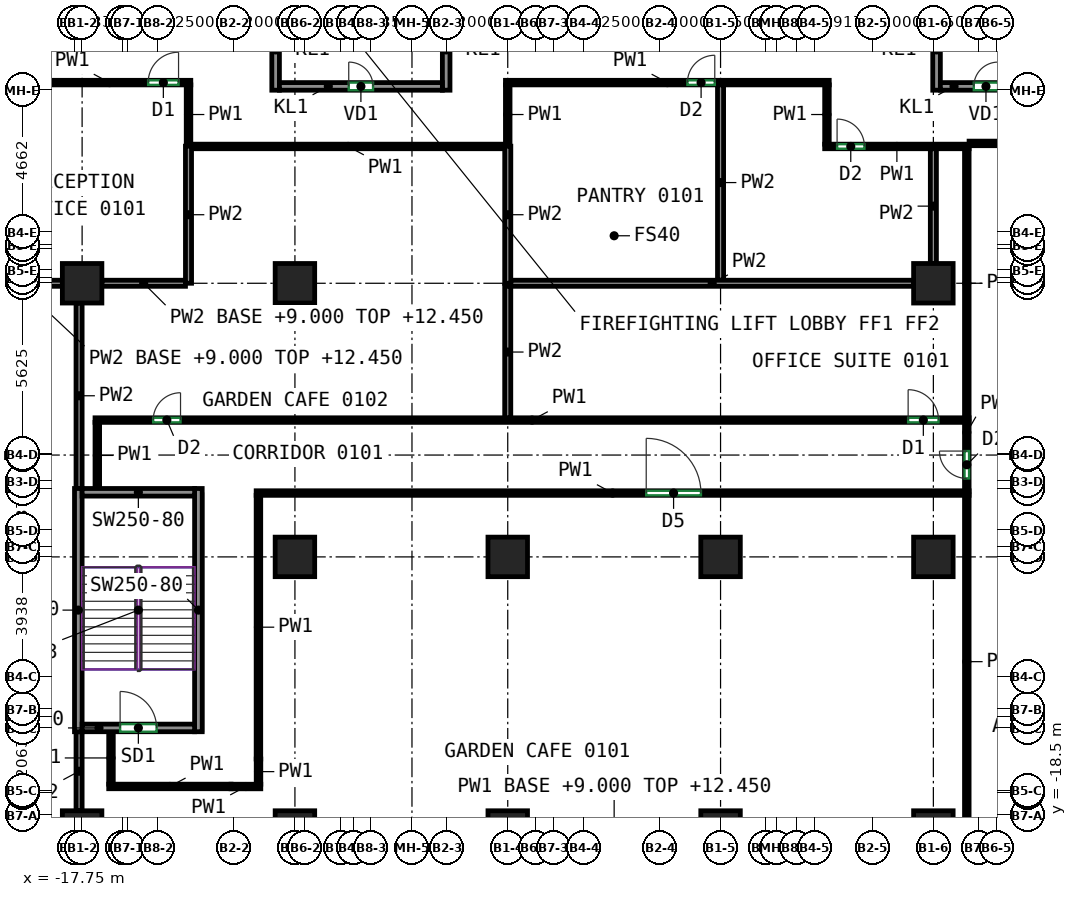
"""IFC4 building model, lengths in metres.
Left out: names, types, materials, properties, quantities, classifications, styles, units other than length and angle.
Written with IfcOpenShell. Run it as: python <this file> out.ifc"""

import sys

from ifc_helpers import new_model, si_unit, direction, frame, frame_2d, origin, origin_2d, place, context, subcontext, project, spatial, rectangle, extrude, source, transform, mapped, element, fill, save


model = new_model("IFC4")
c1 = context("Model", 3, precision=1e-05, world=origin(), true_north=direction((0.0, 1.0)))
c2 = subcontext(c1, "Body", "Model", "MODEL_VIEW")
j1 = project(units=[si_unit("LENGTHUNIT", "METRE"), si_unit("PLANEANGLEUNIT", "RADIAN")], contexts=[c1])
p1 = place(None, origin())
s1 = spatial("IfcSite", under=j1, at=p1, CompositionType="ELEMENT")
p2 = place(p1, origin())
s2 = spatial("IfcBuilding", under=s1, at=p2, CompositionType="ELEMENT")
p3 = place(p2, frame((0.0, 0.0, 9.0)))
s3 = spatial("IfcBuildingStorey", under=s2, at=p3, CompositionType="ELEMENT", Elevation=9.0)
m1 = source(origin(), c2, "Body", "SweptSolid", [
    extrude(rectangle(XDim=1.3, YDim=1.3, at=origin_2d()), origin(), (0.0, 0.0, 1.0), 4.1),
])
for number, where, z_axis, x_axis in (
    (1, (-17.5, -19.0, 0.0), (0.0, 0.0, 1.0), (1.0, 0.0, 0.0)),
    (2, (-17.5, -1.0, 0.0), (0.0, 0.0, 1.0), (1.0, 0.0, 0.0)),
    (3, (-10.5, -19.0, 0.0), (0.0, 0.0, 1.0), (1.0, 0.0, 0.0)),
    (4, (-10.5, -10.0, 0.0), (0.0, 0.0, 1.0), (1.0, 0.0, 0.0)),
    (5, (-10.5, -1.0, 0.0), (0.0, 0.0, 1.0), (1.0, 0.0, 0.0)),
    (6, (-3.5, -19.0, 0.0), (0.0, 0.0, 1.0), (1.0, 0.0, 0.0)),
    (7, (-3.5, -10.0, 0.0), (0.0, 0.0, 1.0), (1.0, 0.0, 0.0)),
    (8, (3.5, -19.0, 0.0), (0.0, 0.0, 1.0), (1.0, 0.0, 0.0)),
    (9, (3.5, -10.0, 0.0), (0.0, 0.0, 1.0), (1.0, 0.0, 0.0)),
    (10, (10.5, -19.0, 0.0), (0.0, 0.0, 1.0), (1.0, 0.0, 0.0)),
    (11, (10.5, -10.0, 0.0), (0.0, 0.0, 1.0), (1.0, 0.0, 0.0)),
    (12, (10.5, -1.0, 0.0), (0.0, 0.0, 1.0), (1.0, 0.0, 0.0)),
):
    element("IfcColumn", number, at=place(p3, frame(where, z_axis=z_axis, x_axis=x_axis)), inside=s3, PredefinedType="COLUMN", context=c2, shape_type="MappedRepresentation", body=[
        mapped(m1, transform((0.0, 0.0, 0.0))),
    ])
m2 = source(origin(), c2, "Body", "SweptSolid", [
    extrude(rectangle(XDim=8.0, YDim=0.25, at=frame_2d((4.0, 0.0))), origin(), (0.0, 0.0, 1.0), 4.1),
])
for number, where, z_axis, x_axis in (
    (13, (-17.625, -15.75, 0.0), (0.0, 0.0, 1.0), (0.0, 1.0, 0.0)),
    (14, (-13.675, -15.75, 0.0), (0.0, 0.0, 1.0), (0.0, 1.0, 0.0)),
):
    element("IfcWall", number, at=place(p3, frame(where, z_axis=z_axis, x_axis=x_axis)), inside=s3, PredefinedType="SHEAR", context=c2, shape_type="MappedRepresentation", body=[
        mapped(m2, transform((0.0, 0.0, 0.0))),
    ])
m3 = source(origin(), c2, "Body", "SweptSolid", [
    extrude(rectangle(XDim=3.7, YDim=0.25, at=frame_2d((1.85, 0.0))), origin(), (0.0, 0.0, 1.0), 4.1),
])
p4 = place(p3, frame((-17.5, -15.625, 0.0), z_axis=(0.0, 0.0, 1.0), x_axis=(1.0, 0.0, 0.0)))
e15 = element("IfcWall", 15, at=p4, inside=s3, PredefinedType="SHEAR", context=c2, shape_type="MappedRepresentation", body=[
    mapped(m3, transform((0.0, 0.0, 0.0))),
])
p5 = place(p4, frame((1.25, 0.0, 0.0)))
e16 = element("IfcOpeningElement", 16, at=p5, cuts=e15, PredefinedType="OPENING", context=c2, shape_type="SweptSolid", body=[
    extrude(rectangle(XDim=1.2, YDim=2.1, at=frame_2d((0.6, 1.05))), frame((0.0, 0.135, 0.0), z_axis=(0.0, -1.0, 0.0), x_axis=(1.0, 0.0, 0.0)), (0.0, 0.0, 1.0), 0.27),
])
p6 = place(p3, frame((-17.5, -7.875, 0.0), z_axis=(0.0, 0.0, 1.0), x_axis=(1.0, 0.0, 0.0)))
e17 = element("IfcWall", 17, at=p6, inside=s3, PredefinedType="SHEAR", context=c2, shape_type="MappedRepresentation", body=[
    mapped(m3, transform((0.0, 0.0, 0.0))),
])
m4 = source(origin(), c2, "Body", "SweptSolid", [
    extrude(rectangle(XDim=2.65, YDim=0.25, at=frame_2d((1.325, 0.0))), origin(), (0.0, 0.0, 1.0), 4.1),
])
for number, where, z_axis, x_axis in (
    (18, (-11.135, 5.35, 0.0), (0.0, 0.0, 1.0), (0.0, 1.0, 0.0)),
    (19, (-5.525, 5.35, 0.0), (0.0, 0.0, 1.0), (0.0, 1.0, 0.0)),
):
    element("IfcWall", number, at=place(p3, frame(where, z_axis=z_axis, x_axis=x_axis)), inside=s3, PredefinedType="PARTITIONING", context=c2, shape_type="MappedRepresentation", body=[
        mapped(m4, transform((0.0, 0.0, 0.0))),
    ])
m5 = source(origin(), c2, "Body", "SweptSolid", [
    extrude(rectangle(XDim=5.36, YDim=0.25, at=frame_2d((2.68, 0.0))), origin(), (0.0, 0.0, 1.0), 4.1),
])
p7 = place(p3, frame((-11.01, 5.475, 0.0), z_axis=(0.0, 0.0, 1.0), x_axis=(1.0, 0.0, 0.0)))
e20 = element("IfcWall", 20, at=p7, inside=s3, PredefinedType="PARTITIONING", context=c2, shape_type="MappedRepresentation", body=[
    mapped(m5, transform((0.0, 0.0, 0.0))),
])
p8 = place(p7, frame((2.28, 0.0, 0.0)))
e21 = element("IfcOpeningElement", 21, at=p8, cuts=e20, PredefinedType="OPENING", context=c2, shape_type="SweptSolid", body=[
    extrude(rectangle(XDim=0.8, YDim=2.0, at=frame_2d((0.4, 1.0))), frame((0.0, 0.135, 0.0), z_axis=(0.0, -1.0, 0.0), x_axis=(1.0, 0.0, 0.0)), (0.0, 0.0, 1.0), 0.27),
])
p9 = place(p3, frame((10.605, 5.35, 0.0), z_axis=(0.0, 0.0, 1.0), x_axis=(0.0, 1.0, 0.0)))
e22 = element("IfcWall", 22, at=p9, inside=s3, PredefinedType="PARTITIONING", context=c2, shape_type="MappedRepresentation", body=[
    mapped(m4, transform((0.0, 0.0, 0.0))),
])
m6 = source(origin(), c2, "Body", "SweptSolid", [
    extrude(rectangle(XDim=3.0, YDim=0.25, at=frame_2d((1.5, 0.0))), origin(), (0.0, 0.0, 1.0), 4.1),
])
p10 = place(p3, frame((10.73, 5.475, 0.0), z_axis=(0.0, 0.0, 1.0), x_axis=(1.0, 0.0, 0.0)))
e23 = element("IfcWall", 23, at=p10, inside=s3, PredefinedType="PARTITIONING", context=c2, shape_type="MappedRepresentation", body=[
    mapped(m6, transform((0.0, 0.0, 0.0))),
])
p11 = place(p10, frame((1.1, 0.0, 0.0)))
e24 = element("IfcOpeningElement", 24, at=p11, cuts=e23, PredefinedType="OPENING", context=c2, shape_type="SweptSolid", body=[
    extrude(rectangle(XDim=0.8, YDim=2.0, at=frame_2d((0.4, 1.0))), frame((0.0, 0.135, 0.0), z_axis=(0.0, -1.0, 0.0), x_axis=(1.0, 0.0, 0.0)), (0.0, 0.0, 1.0), 0.27),
])
p12 = place(p3, frame((11.6, -7.835, 0.0), z_axis=(0.0, 0.0, 1.0), x_axis=(0.0, 1.0, 0.0)))
e25 = element("IfcWall", 25, at=p12, inside=s3, PredefinedType="PARTITIONING", context=c2, shape_type="SweptSolid", body=[
    extrude(rectangle(XDim=2.27, YDim=0.15, at=frame_2d((1.135, 0.0))), origin(), (0.0, 0.0, 1.0), 4.1),
])
p13 = place(p12, frame((0.416, 0.0, 0.0)))
e26 = element("IfcOpeningElement", 26, at=p13, cuts=e25, PredefinedType="OPENING", context=c2, shape_type="SweptSolid", body=[
    extrude(rectangle(XDim=0.9, YDim=2.1, at=frame_2d((0.45, 1.05))), frame((0.0, 0.085, 0.0), z_axis=(0.0, -1.0, 0.0), x_axis=(1.0, 0.0, 0.0)), (0.0, 0.0, 1.0), 0.17),
])
p14 = place(p3, frame((16.325, 3.6, 0.0), z_axis=(0.0, 0.0, 1.0), x_axis=(-1.0, 0.0, 0.0)))
e27 = element("IfcWall", 27, at=p14, inside=s3, PredefinedType="PARTITIONING", context=c2, shape_type="SweptSolid", body=[
    extrude(rectangle(XDim=4.65, YDim=0.15, at=frame_2d((2.325, 0.0))), origin(), (0.0, 0.0, 1.0), 4.1),
])
p15 = place(p3, frame((11.6, -18.925, 0.0), z_axis=(0.0, 0.0, 1.0), x_axis=(0.0, 1.0, 0.0)))
e28 = element("IfcWall", 28, at=p15, inside=s3, PredefinedType="PARTITIONING", context=c2, shape_type="SweptSolid", body=[
    extrude(rectangle(XDim=10.959, YDim=0.15, at=frame_2d((5.479, 0.0))), origin(), (0.0, 0.0, 1.0), 4.1),
])
p16 = place(p3, frame((11.6, -5.434, 0.0), z_axis=(0.0, 0.0, 1.0), x_axis=(0.0, 1.0, 0.0)))
e29 = element("IfcWall", 29, at=p16, inside=s3, PredefinedType="PARTITIONING", context=c2, shape_type="SweptSolid", body=[
    extrude(rectangle(XDim=8.868, YDim=0.15, at=frame_2d((4.434, 0.0))), origin(), (0.0, 0.0, 1.0), 4.1),
])
p17 = place(p3, frame((-16.625, -17.55, 0.0), z_axis=(0.0, 0.0, 1.0), x_axis=(1.0, 0.0, 0.0)))
e30 = element("IfcWall", 30, at=p17, inside=s3, PredefinedType="PARTITIONING", context=c2, shape_type="SweptSolid", body=[
    extrude(rectangle(XDim=4.023, YDim=0.15, at=frame_2d((2.011, 0.0))), origin(), (0.0, 0.0, 1.0), 4.1),
])
p18 = place(p3, frame((-16.55, -15.75, 0.0), z_axis=(0.0, 0.0, 1.0), x_axis=(0.0, -1.0, 0.0)))
e31 = element("IfcWall", 31, at=p18, inside=s3, PredefinedType="PARTITIONING", context=c2, shape_type="SweptSolid", body=[
    extrude(rectangle(XDim=1.725, YDim=0.15, at=frame_2d((0.863, 0.0))), origin(), (0.0, 0.0, 1.0), 4.1),
])
p19 = place(p3, frame((-11.775, -7.9, 0.0), z_axis=(0.0, 0.0, 1.0), x_axis=(1.0, 0.0, 0.0)))
e32 = element("IfcWall", 32, at=p19, inside=s3, PredefinedType="PARTITIONING", context=c2, shape_type="SweptSolid", body=[
    extrude(rectangle(XDim=23.45, YDim=0.15, at=frame_2d((11.725, 0.0))), origin(), (0.0, 0.0, 1.0), 4.1),
])
p20 = place(p19, frame((12.83, 0.0, 0.0)))
e33 = element("IfcOpeningElement", 33, at=p20, cuts=e32, PredefinedType="OPENING", context=c2, shape_type="SweptSolid", body=[
    extrude(rectangle(XDim=1.8, YDim=2.1, at=frame_2d((0.9, 1.05))), frame((0.0, 0.085, 0.0), z_axis=(0.0, -1.0, 0.0), x_axis=(1.0, 0.0, 0.0)), (0.0, 0.0, 1.0), 0.17),
])
p21 = place(p3, frame((-11.7, -16.648, 0.0), z_axis=(0.0, 0.0, 1.0), x_axis=(0.0, 1.0, 0.0)))
e34 = element("IfcWall", 34, at=p21, inside=s3, PredefinedType="PARTITIONING", context=c2, shape_type="SweptSolid", body=[
    extrude(rectangle(XDim=8.673, YDim=0.15, at=frame_2d((4.336, 0.0))), origin(), (0.0, 0.0, 1.0), 4.1),
])
p22 = place(p3, frame((-11.698, -17.477, 0.0), z_axis=(0.0, 0.0, 1.0), x_axis=(0.0, 1.0, 0.0)))
e35 = element("IfcWall", 35, at=p22, inside=s3, PredefinedType="PARTITIONING", context=c2, shape_type="SweptSolid", body=[
    extrude(rectangle(XDim=0.829, YDim=0.15, at=frame_2d((0.415, 0.0))), origin(), (0.0, 0.0, 1.0), 4.1),
])
p23 = place(p3, frame((-12.602, -17.552, 0.0), z_axis=(0.0, 0.0, 1.0), x_axis=(1.0, 0.0, 0.0)))
e36 = element("IfcWall", 36, at=p23, inside=s3, PredefinedType="PARTITIONING", context=c2, shape_type="SweptSolid", body=[
    extrude(rectangle(XDim=0.979, YDim=0.15, at=frame_2d((0.49, 0.0))), origin(), (0.0, 0.0, 1.0), 4.1),
])
p24 = place(p3, frame((-17.0, -5.575, 0.0), z_axis=(0.0, 0.0, 1.0), x_axis=(0.0, -1.0, 0.0)))
e37 = element("IfcWall", 37, at=p24, inside=s3, PredefinedType="PARTITIONING", context=c2, shape_type="SweptSolid", body=[
    extrude(rectangle(XDim=2.175, YDim=0.15, at=frame_2d((1.087, 0.0))), origin(), (0.0, 0.0, 1.0), 4.1),
])
p25 = place(p3, frame((-17.075, -5.5, 0.0), z_axis=(0.0, 0.0, 1.0), x_axis=(1.0, 0.0, 0.0)))
e38 = element("IfcWall", 38, at=p25, inside=s3, PredefinedType="PARTITIONING", context=c2, shape_type="SweptSolid", body=[
    extrude(rectangle(XDim=28.75, YDim=0.15, at=frame_2d((14.375, 0.0))), origin(), (0.0, 0.0, 1.0), 4.1),
])
p26 = place(p25, frame((1.912, 0.0, 0.0)))
e39 = element("IfcOpeningElement", 39, at=p26, cuts=e38, PredefinedType="OPENING", context=c2, shape_type="SweptSolid", body=[
    extrude(rectangle(XDim=0.9, YDim=2.1, at=frame_2d((0.45, 1.05))), frame((0.0, 0.085, 0.0), z_axis=(0.0, -1.0, 0.0), x_axis=(1.0, 0.0, 0.0)), (0.0, 0.0, 1.0), 0.17),
])
p27 = place(p25, frame((26.745, 0.0, 0.0)))
e40 = element("IfcOpeningElement", 40, at=p27, cuts=e38, PredefinedType="OPENING", context=c2, shape_type="SweptSolid", body=[
    extrude(rectangle(XDim=1.0, YDim=2.1, at=frame_2d((0.5, 1.05))), frame((0.0, 0.085, 0.0), z_axis=(0.0, -1.0, 0.0), x_axis=(1.0, 0.0, 0.0)), (0.0, 0.0, 1.0), 0.17),
])
p28 = place(p3, frame((-14.0, 5.525, 0.0), z_axis=(0.0, 0.0, 1.0), x_axis=(0.0, -1.0, 0.0)))
e41 = element("IfcWall", 41, at=p28, inside=s3, PredefinedType="PARTITIONING", context=c2, shape_type="SweptSolid", body=[
    extrude(rectangle(XDim=1.95, YDim=0.15, at=frame_2d((0.975, 0.0))), origin(), (0.0, 0.0, 1.0), 4.1),
])
p29 = place(p3, frame((-19.275, 5.6, 0.0), z_axis=(0.0, 0.0, 1.0), x_axis=(1.0, 0.0, 0.0)))
e42 = element("IfcWall", 42, at=p29, inside=s3, PredefinedType="PARTITIONING", context=c2, shape_type="SweptSolid", body=[
    extrude(rectangle(XDim=5.35, YDim=0.15, at=frame_2d((2.675, 0.0))), origin(), (0.0, 0.0, 1.0), 4.1),
])
p30 = place(p29, frame((3.947, 0.0, 0.0)))
e43 = element("IfcOpeningElement", 43, at=p30, cuts=e42, PredefinedType="OPENING", context=c2, shape_type="SweptSolid", body=[
    extrude(rectangle(XDim=1.0, YDim=2.1, at=frame_2d((0.5, 1.05))), frame((0.0, 0.085, 0.0), z_axis=(0.0, -1.0, 0.0), x_axis=(1.0, 0.0, 0.0)), (0.0, 0.0, 1.0), 0.17),
])
p31 = place(p3, frame((-3.575, 5.6, 0.0), z_axis=(0.0, 0.0, 1.0), x_axis=(1.0, 0.0, 0.0)))
e44 = element("IfcWall", 44, at=p31, inside=s3, PredefinedType="PARTITIONING", context=c2, shape_type="SweptSolid", body=[
    extrude(rectangle(XDim=10.65, YDim=0.15, at=frame_2d((5.325, 0.0))), origin(), (0.0, 0.0, 1.0), 4.1),
])
p32 = place(p31, frame((5.985, 0.0, 0.0)))
e45 = element("IfcOpeningElement", 45, at=p32, cuts=e44, PredefinedType="OPENING", context=c2, shape_type="SweptSolid", body=[
    extrude(rectangle(XDim=0.9, YDim=2.1, at=frame_2d((0.45, 1.05))), frame((0.0, 0.085, 0.0), z_axis=(0.0, -1.0, 0.0), x_axis=(1.0, 0.0, 0.0)), (0.0, 0.0, 1.0), 0.17),
])
p33 = place(p3, frame((-3.5, 3.575, 0.0), z_axis=(0.0, 0.0, 1.0), x_axis=(0.0, 1.0, 0.0)))
e46 = element("IfcWall", 46, at=p33, inside=s3, PredefinedType="PARTITIONING", context=c2, shape_type="SweptSolid", body=[
    extrude(rectangle(XDim=1.95, YDim=0.15, at=frame_2d((0.975, 0.0))), origin(), (0.0, 0.0, 1.0), 4.1),
])
p34 = place(p3, frame((6.925, 3.5, 0.0), z_axis=(0.0, 0.0, 1.0), x_axis=(1.0, 0.0, 0.0)))
e47 = element("IfcWall", 47, at=p34, inside=s3, PredefinedType="PARTITIONING", context=c2, shape_type="SweptSolid", body=[
    extrude(rectangle(XDim=4.75, YDim=0.15, at=frame_2d((2.375, 0.0))), origin(), (0.0, 0.0, 1.0), 4.1),
])
p35 = place(p34, frame((0.408, 0.0, 0.0)))
e48 = element("IfcOpeningElement", 48, at=p35, cuts=e47, PredefinedType="OPENING", context=c2, shape_type="SweptSolid", body=[
    extrude(rectangle(XDim=0.9, YDim=2.1, at=frame_2d((0.45, 1.05))), frame((0.0, 0.085, 0.0), z_axis=(0.0, -1.0, 0.0), x_axis=(1.0, 0.0, 0.0)), (0.0, 0.0, 1.0), 0.17),
])
p36 = place(p3, frame((7.0, 5.525, 0.0), z_axis=(0.0, 0.0, 1.0), x_axis=(0.0, -1.0, 0.0)))
e49 = element("IfcWall", 49, at=p36, inside=s3, PredefinedType="PARTITIONING", context=c2, shape_type="SweptSolid", body=[
    extrude(rectangle(XDim=1.95, YDim=0.15, at=frame_2d((0.975, 0.0))), origin(), (0.0, 0.0, 1.0), 4.1),
])
p37 = place(p3, frame((-13.901, 3.5, 0.0), z_axis=(0.0, 0.0, 1.0), x_axis=(1.0, 0.0, 0.0)))
e50 = element("IfcWall", 50, at=p37, inside=s3, PredefinedType="PARTITIONING", context=c2, shape_type="SweptSolid", body=[
    extrude(rectangle(XDim=10.302, YDim=0.15, at=frame_2d((5.151, 0.0))), origin(), (0.0, 0.0, 1.0), 4.1),
])
p38 = place(p3, frame((-21.099, -1.0, 0.0), z_axis=(0.0, 0.0, 1.0), x_axis=(1.0, 0.0, 0.0)))
e51 = element("IfcWall", 51, at=p38, inside=s3, PredefinedType="PARTITIONING", context=c2, shape_type="SweptSolid", body=[
    extrude(rectangle(XDim=2.949, YDim=0.2, at=frame_2d((1.475, 0.0))), origin(), (0.0, 0.0, 1.0), 3.45),
])
p39 = place(p3, frame((-17.6, -18.35, 0.0), z_axis=(0.0, 0.0, 1.0), x_axis=(0.0, 1.0, 0.0)))
e52 = element("IfcWall", 52, at=p39, inside=s3, PredefinedType="PARTITIONING", context=c2, shape_type="SweptSolid", body=[
    extrude(rectangle(XDim=2.6, YDim=0.2, at=frame_2d((1.3, 0.0))), origin(), (0.0, 0.0, 1.0), 4.1),
])
p40 = place(p3, frame((-17.6, -7.75, 0.0), z_axis=(0.0, 0.0, 1.0), x_axis=(0.0, 1.0, 0.0)))
e53 = element("IfcWall", 53, at=p40, inside=s3, PredefinedType="PARTITIONING", context=c2, shape_type="SweptSolid", body=[
    extrude(rectangle(XDim=6.1, YDim=0.2, at=frame_2d((3.05, 0.0))), origin(), (0.0, 0.0, 1.0), 4.1),
])
p41 = place(p3, frame((-16.85, -1.0, 0.0), z_axis=(0.0, 0.0, 1.0), x_axis=(1.0, 0.0, 0.0)))
e54 = element("IfcWall", 54, at=p41, inside=s3, PredefinedType="PARTITIONING", context=c2, shape_type="SweptSolid", body=[
    extrude(rectangle(XDim=2.75, YDim=0.2, at=frame_2d((1.375, 0.0))), origin(), (0.0, 0.0, 1.0), 3.45),
])
p42 = place(p3, frame((-14.0, -1.0, 0.0), z_axis=(0.0, 0.0, 1.0), x_axis=(-0.000216579128, 0.999999976547, 0.0)))
e55 = element("IfcWall", 55, at=p42, inside=s3, PredefinedType="PARTITIONING", context=c2, shape_type="SweptSolid", body=[
    extrude(rectangle(XDim=4.509, YDim=0.2, at=frame_2d((2.254, 0.0))), origin(), (0.0, 0.0, 1.0), 4.1),
])
p43 = place(p3, frame((3.5, -0.9, 0.0), z_axis=(0.0, 0.0, 1.0), x_axis=(0.0, 1.0, 0.0)))
e56 = element("IfcWall", 56, at=p43, inside=s3, PredefinedType="PARTITIONING", context=c2, shape_type="SweptSolid", body=[
    extrude(rectangle(XDim=6.424, YDim=0.2, at=frame_2d((3.212, 0.0))), origin(), (0.0, 0.0, 1.0), 4.1),
])
p44 = place(p3, frame((-3.4, -1.0, 0.0), z_axis=(0.0, 0.0, 1.0), x_axis=(1.0, 0.0, 0.0)))
e57 = element("IfcWall", 57, at=p44, inside=s3, PredefinedType="PARTITIONING", context=c2, shape_type="SweptSolid", body=[
    extrude(rectangle(XDim=13.25, YDim=0.2, at=frame_2d((6.625, 0.0))), origin(), (0.0, 0.0, 1.0), 4.1),
])
p45 = place(p3, frame((-3.499, 3.509, 0.0), z_axis=(0.0, 0.0, 1.0), x_axis=(-0.000216579128, -0.999999976547, 0.0)))
e58 = element("IfcWall", 58, at=p45, inside=s3, PredefinedType="PARTITIONING", context=c2, shape_type="SweptSolid", body=[
    extrude(rectangle(XDim=4.509, YDim=0.2, at=frame_2d((2.254, 0.0))), origin(), (0.0, 0.0, 1.0), 4.1),
])
p46 = place(p3, frame((10.5, -0.35, 0.0), z_axis=(0.0, 0.0, 1.0), x_axis=(0.0, 1.0, 0.0)))
e59 = element("IfcWall", 59, at=p46, inside=s3, PredefinedType="PARTITIONING", context=c2, shape_type="SweptSolid", body=[
    extrude(rectangle(XDim=3.774, YDim=0.2, at=frame_2d((1.887, 0.0))), origin(), (0.0, 0.0, 1.0), 4.1),
])
p47 = place(p3, frame((-3.5, -5.424, 0.0), z_axis=(0.0, 0.0, 1.0), x_axis=(0.0, 1.0, 0.0)))
e60 = element("IfcWall", 60, at=p47, inside=s3, PredefinedType="PARTITIONING", context=c2, shape_type="SweptSolid", body=[
    extrude(rectangle(XDim=4.324, YDim=0.2, at=frame_2d((2.162, 0.0))), origin(), (0.0, 0.0, 1.0), 4.1),
])
p48 = place(p8, origin())
e61 = element("IfcDoor", 61, at=p48, inside=s3, OperationType="SINGLE_SWING_LEFT", PredefinedType="DOOR", context=c2, shape_type="SweptSolid", body=[
    extrude(rectangle(XDim=0.8, YDim=2.0, at=frame_2d((0.4, 1.0))), frame((0.0, 0.025, 0.0), z_axis=(0.0, -1.0, 0.0), x_axis=(1.0, 0.0, 0.0)), (0.0, 0.0, 1.0), 0.05),
])
fill(e21, e61)
p49 = place(p11, origin())
e62 = element("IfcDoor", 62, at=p49, inside=s3, OperationType="SINGLE_SWING_RIGHT", PredefinedType="DOOR", context=c2, shape_type="SweptSolid", body=[
    extrude(rectangle(XDim=0.8, YDim=2.0, at=frame_2d((0.4, 1.0))), frame((0.0, 0.025, 0.0), z_axis=(0.0, -1.0, 0.0), x_axis=(1.0, 0.0, 0.0)), (0.0, 0.0, 1.0), 0.05),
])
fill(e24, e62)
p50 = place(p5, origin())
e63 = element("IfcDoor", 63, at=p50, inside=s3, OperationType="DOUBLE_DOOR_SINGLE_SWING", PredefinedType="DOOR", context=c2, shape_type="SweptSolid", body=[
    extrude(rectangle(XDim=1.2, YDim=2.1, at=frame_2d((0.6, 1.05))), frame((0.0, 0.025, 0.0), z_axis=(0.0, -1.0, 0.0), x_axis=(1.0, 0.0, 0.0)), (0.0, 0.0, 1.0), 0.05),
])
fill(e16, e63)
p51 = place(p20, origin())
e64 = element("IfcDoor", 64, at=p51, inside=s3, OperationType="DOUBLE_DOOR_SINGLE_SWING", PredefinedType="DOOR", context=c2, shape_type="SweptSolid", body=[
    extrude(rectangle(XDim=1.8, YDim=2.1, at=frame_2d((0.9, 1.05))), frame((0.0, 0.025, 0.0), z_axis=(0.0, -1.0, 0.0), x_axis=(1.0, 0.0, 0.0)), (0.0, 0.0, 1.0), 0.05),
])
fill(e33, e64)
p52 = place(p13, origin())
e65 = element("IfcDoor", 65, at=p52, inside=s3, OperationType="SINGLE_SWING_RIGHT", PredefinedType="DOOR", context=c2, shape_type="SweptSolid", body=[
    extrude(rectangle(XDim=0.9, YDim=2.1, at=frame_2d((0.45, 1.05))), frame((0.0, 0.025, 0.0), z_axis=(0.0, -1.0, 0.0), x_axis=(1.0, 0.0, 0.0)), (0.0, 0.0, 1.0), 0.05),
])
fill(e26, e65)
p53 = place(p26, origin())
e66 = element("IfcDoor", 66, at=p53, inside=s3, OperationType="SINGLE_SWING_RIGHT", PredefinedType="DOOR", context=c2, shape_type="SweptSolid", body=[
    extrude(rectangle(XDim=0.9, YDim=2.1, at=frame_2d((0.45, 1.05))), frame((0.0, 0.025, 0.0), z_axis=(0.0, -1.0, 0.0), x_axis=(1.0, 0.0, 0.0)), (0.0, 0.0, 1.0), 0.05),
])
fill(e39, e66)
p54 = place(p27, origin())
e67 = element("IfcDoor", 67, at=p54, inside=s3, OperationType="SINGLE_SWING_LEFT", PredefinedType="DOOR", context=c2, shape_type="SweptSolid", body=[
    extrude(rectangle(XDim=1.0, YDim=2.1, at=frame_2d((0.5, 1.05))), frame((0.0, 0.025, 0.0), z_axis=(0.0, -1.0, 0.0), x_axis=(1.0, 0.0, 0.0)), (0.0, 0.0, 1.0), 0.05),
])
fill(e40, e67)
p55 = place(p35, origin())
e68 = element("IfcDoor", 68, at=p55, inside=s3, OperationType="SINGLE_SWING_LEFT", PredefinedType="DOOR", context=c2, shape_type="SweptSolid", body=[
    extrude(rectangle(XDim=0.9, YDim=2.1, at=frame_2d((0.45, 1.05))), frame((0.0, 0.025, 0.0), z_axis=(0.0, -1.0, 0.0), x_axis=(1.0, 0.0, 0.0)), (0.0, 0.0, 1.0), 0.05),
])
fill(e48, e68)
p56 = place(p30, origin())
e69 = element("IfcDoor", 69, at=p56, inside=s3, OperationType="SINGLE_SWING_RIGHT", PredefinedType="DOOR", context=c2, shape_type="SweptSolid", body=[
    extrude(rectangle(XDim=1.0, YDim=2.1, at=frame_2d((0.5, 1.05))), frame((0.0, 0.025, 0.0), z_axis=(0.0, -1.0, 0.0), x_axis=(1.0, 0.0, 0.0)), (0.0, 0.0, 1.0), 0.05),
])
fill(e43, e69)
p57 = place(p32, origin())
e70 = element("IfcDoor", 70, at=p57, inside=s3, OperationType="SINGLE_SWING_RIGHT", PredefinedType="DOOR", context=c2, shape_type="SweptSolid", body=[
    extrude(rectangle(XDim=0.9, YDim=2.1, at=frame_2d((0.45, 1.05))), frame((0.0, 0.025, 0.0), z_axis=(0.0, -1.0, 0.0), x_axis=(1.0, 0.0, 0.0)), (0.0, 0.0, 1.0), 0.05),
])
fill(e45, e70)
save(model, sys.argv[1])
